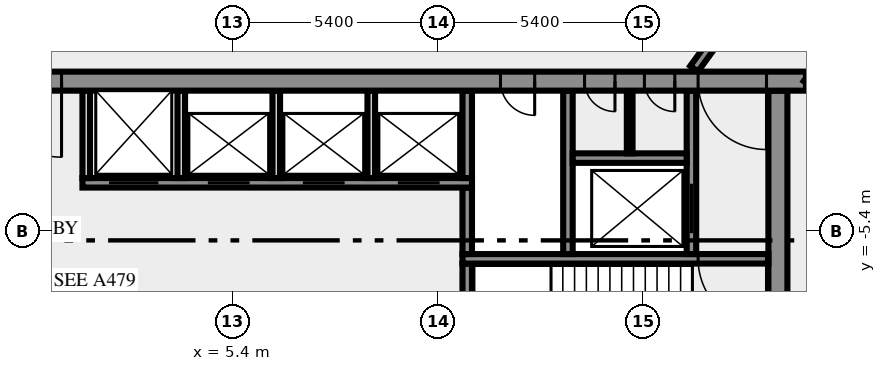
"""IFC4 building model, lengths in metres.
Left out: names, types, materials, properties, quantities, classifications, styles, units other than length and angle.
Written with IfcOpenShell. Run it as: python <this file> out.ifc"""

import sys

from ifc_helpers import new_model, si_unit, direction, frame, frame_2d, origin, place, context, subcontext, project, spatial, rectangle, extrude, element, fill, save


model = new_model("IFC4")
c1 = context("Model", 3, precision=1e-05, world=origin(), true_north=direction((0.0, 1.0)))
c2 = subcontext(c1, "Body", "Model", "MODEL_VIEW")
j1 = project(units=[si_unit("LENGTHUNIT", "METRE"), si_unit("PLANEANGLEUNIT", "RADIAN")], contexts=[c1])
p1 = place(None, origin())
s1 = spatial("IfcSite", under=j1, at=p1, CompositionType="ELEMENT")
p2 = place(p1, origin())
s2 = spatial("IfcBuilding", under=s1, at=p2, CompositionType="ELEMENT")
p3 = place(p2, frame((0.0, 0.0, 148.0)))
s3 = spatial("IfcBuildingStorey", under=s2, at=p3, CompositionType="ELEMENT", Elevation=148.0)
p4 = place(p3, frame((19.75, -10.5, 0.0), z_axis=(0.0, 0.0, 1.0), x_axis=(0.0, 1.0, 0.0)))
e1 = element("IfcWall", 1, at=p4, inside=s3, PredefinedType="SHEAR", context=c2, shape_type="SweptSolid", body=[
    extrude(rectangle(XDim=8.8, YDim=0.5, at=frame_2d((4.4, 0.0))), origin(), (0.0, 0.0, 1.0), 3.65),
])
p5 = place(p3, frame((11.575, -7.25, 0.0), z_axis=(0.0, 0.0, 1.0), x_axis=(0.0, 1.0, 0.0)))
e2 = element("IfcWall", 2, at=p5, inside=s3, PredefinedType="SHEAR", context=c2, shape_type="SweptSolid", body=[
    extrude(rectangle(XDim=1.0, YDim=0.25, at=frame_2d((0.5, 0.0))), origin(), (0.0, 0.0, 1.0), 3.65),
])
p6 = place(p3, frame((19.5, -6.125, 0.0), z_axis=(0.0, 0.0, 1.0), x_axis=(-1.0, 0.0, 0.0)))
e3 = element("IfcWall", 3, at=p6, inside=s3, PredefinedType="SHEAR", context=c2, shape_type="SweptSolid", body=[
    extrude(rectangle(XDim=8.05, YDim=0.25, at=frame_2d((4.025, 0.0))), origin(), (0.0, 0.0, 1.0), 3.65),
])
p7 = place(p6, frame((0.05, 0.0, 0.0)))
e4 = element("IfcOpeningElement", 4, at=p7, cuts=e3, PredefinedType="OPENING", context=c2, shape_type="SweptSolid", body=[
    extrude(rectangle(XDim=1.8, YDim=2.1, at=frame_2d((0.9, 1.05))), frame((0.0, 0.135, 0.0), z_axis=(0.0, -1.0, 0.0), x_axis=(1.0, 0.0, 0.0)), (0.0, 0.0, 1.0), 0.27),
])
p8 = place(p3, frame((11.575, -6.0, 0.0), z_axis=(0.0, 0.0, 1.0), x_axis=(0.0, 1.0, 0.0)))
e5 = element("IfcWall", 5, at=p8, inside=s3, PredefinedType="SHEAR", context=c2, shape_type="SweptSolid", body=[
    extrude(rectangle(XDim=1.75, YDim=0.25, at=frame_2d((0.875, 0.0))), origin(), (0.0, 0.0, 1.0), 3.65),
])
p9 = place(p3, frame((14.225, -6.0, 0.0), z_axis=(0.0, 0.0, 1.0), x_axis=(0.0, 1.0, 0.0)))
e6 = element("IfcWall", 6, at=p9, inside=s3, PredefinedType="SHEAR", context=c2, shape_type="SweptSolid", body=[
    extrude(rectangle(XDim=4.3, YDim=0.25, at=frame_2d((2.15, 0.0))), origin(), (0.0, 0.0, 1.0), 3.65),
])
p10 = place(p3, frame((17.475, -6.0, 0.0), z_axis=(0.0, 0.0, 1.0), x_axis=(0.0, 1.0, 0.0)))
e7 = element("IfcWall", 7, at=p10, inside=s3, PredefinedType="SHEAR", context=c2, shape_type="SweptSolid", body=[
    extrude(rectangle(XDim=4.3, YDim=0.25, at=frame_2d((2.15, 0.0))), origin(), (0.0, 0.0, 1.0), 3.65),
])
p11 = place(p10, frame((0.55, 0.0, 0.0)))
e8 = element("IfcOpeningElement", 8, at=p11, cuts=e7, PredefinedType="OPENING", context=c2, shape_type="SweptSolid", body=[
    extrude(rectangle(XDim=1.3, YDim=2.1, at=frame_2d((0.65, 1.05))), frame((0.0, 0.135, 0.0), z_axis=(0.0, -1.0, 0.0), x_axis=(1.0, 0.0, 0.0)), (0.0, 0.0, 1.0), 0.27),
])
p12 = place(p3, frame((1.45, -4.125, 0.0), z_axis=(0.0, 0.0, 1.0), x_axis=(1.0, 0.0, 0.0)))
e9 = element("IfcWall", 9, at=p12, inside=s3, PredefinedType="SHEAR", context=c2, shape_type="SweptSolid", body=[
    extrude(rectangle(XDim=10.25, YDim=0.25, at=frame_2d((5.125, 0.0))), origin(), (0.0, 0.0, 1.0), 3.65),
])
p13 = place(p12, frame((0.7, 0.0, 0.0)))
e10 = element("IfcOpeningElement", 10, at=p13, cuts=e9, PredefinedType="OPENING", context=c2, shape_type="SweptSolid", body=[
    extrude(rectangle(XDim=1.3, YDim=2.1, at=frame_2d((0.65, 1.05))), frame((0.0, 0.135, 0.0), z_axis=(0.0, -1.0, 0.0), x_axis=(1.0, 0.0, 0.0)), (0.0, 0.0, 1.0), 0.27),
])
p14 = place(p12, frame((3.3, 0.0, 0.0)))
e11 = element("IfcOpeningElement", 11, at=p14, cuts=e9, PredefinedType="OPENING", context=c2, shape_type="SweptSolid", body=[
    extrude(rectangle(XDim=1.1, YDim=2.1, at=frame_2d((0.55, 1.05))), frame((0.0, 0.135, 0.0), z_axis=(0.0, -1.0, 0.0), x_axis=(1.0, 0.0, 0.0)), (0.0, 0.0, 1.0), 0.27),
])
p15 = place(p12, frame((5.8, 0.0, 0.0)))
e12 = element("IfcOpeningElement", 12, at=p15, cuts=e9, PredefinedType="OPENING", context=c2, shape_type="SweptSolid", body=[
    extrude(rectangle(XDim=1.1, YDim=2.1, at=frame_2d((0.55, 1.05))), frame((0.0, 0.135, 0.0), z_axis=(0.0, -1.0, 0.0), x_axis=(1.0, 0.0, 0.0)), (0.0, 0.0, 1.0), 0.27),
])
p16 = place(p12, frame((8.3, 0.0, 0.0)))
e13 = element("IfcOpeningElement", 13, at=p16, cuts=e9, PredefinedType="OPENING", context=c2, shape_type="SweptSolid", body=[
    extrude(rectangle(XDim=1.1, YDim=2.1, at=frame_2d((0.55, 1.05))), frame((0.0, 0.135, 0.0), z_axis=(0.0, -1.0, 0.0), x_axis=(1.0, 0.0, 0.0)), (0.0, 0.0, 1.0), 0.27),
])
for number, where, z_axis, x_axis in (
    (14, (1.55, -4.0, 0.0), (0.0, 0.0, 1.0), (0.0, 1.0, 0.0)),
    (15, (4.05, -4.0, 0.0), (0.0, 0.0, 1.0), (0.0, 1.0, 0.0)),
    (16, (6.55, -4.0, 0.0), (0.0, 0.0, 1.0), (0.0, 1.0, 0.0)),
    (17, (9.05, -4.0, 0.0), (0.0, 0.0, 1.0), (0.0, 1.0, 0.0)),
):
    element("IfcWall", number, at=place(p3, frame(where, z_axis=z_axis, x_axis=x_axis)), inside=s3, PredefinedType="SOLIDWALL", context=c2, shape_type="SweptSolid", body=[
        extrude(rectangle(XDim=2.3, YDim=0.2, at=frame_2d((1.15, 0.0))), origin(), (0.0, 0.0, 1.0), 3.65),
    ])
p17 = place(p3, frame((11.575, -4.0, 0.0), z_axis=(0.0, 0.0, 1.0), x_axis=(0.0, 1.0, 0.0)))
e18 = element("IfcWall", 18, at=p17, inside=s3, PredefinedType="SHEAR", context=c2, shape_type="SweptSolid", body=[
    extrude(rectangle(XDim=2.3, YDim=0.25, at=frame_2d((1.15, 0.0))), origin(), (0.0, 0.0, 1.0), 3.65),
])
p18 = place(p3, frame((14.35, -3.475, 0.0), z_axis=(0.0, 0.0, 1.0), x_axis=(1.0, 0.0, 0.0)))
e19 = element("IfcWall", 19, at=p18, inside=s3, PredefinedType="SHEAR", context=c2, shape_type="SweptSolid", body=[
    extrude(rectangle(XDim=3.0, YDim=0.25, at=frame_2d((1.5, 0.0))), origin(), (0.0, 0.0, 1.0), 3.65),
])
p19 = place(p3, frame((15.85, -3.35, 0.0), z_axis=(0.0, 0.0, 1.0), x_axis=(0.0, 1.0, 0.0)))
e20 = element("IfcWall", 20, at=p19, inside=s3, PredefinedType="PARTITIONING", context=c2, shape_type="SweptSolid", body=[
    extrude(rectangle(XDim=1.65, YDim=0.15, at=frame_2d((0.825, 0.0))), origin(), (0.0, 0.0, 1.0), 3.65),
])
p20 = place(p3, frame((20.49, -1.45, 0.0), z_axis=(0.0, 0.0, 1.0), x_axis=(-1.0, 0.0, 0.0)))
e21 = element("IfcWall", 21, at=p20, inside=s3, PredefinedType="SHEAR", context=c2, shape_type="SweptSolid", body=[
    extrude(rectangle(XDim=40.98, YDim=0.5, at=frame_2d((20.49, 0.0))), origin(), (0.0, 0.0, 1.0), 3.65),
])
p21 = place(p20, frame((38.14, 0.0, 0.0)))
e22 = element("IfcOpeningElement", 22, at=p21, cuts=e21, PredefinedType="OPENING", context=c2, shape_type="SweptSolid", body=[
    extrude(rectangle(XDim=1.8, YDim=2.1, at=frame_2d((0.9, 1.05))), frame((0.0, 0.26, 0.0), z_axis=(0.0, -1.0, 0.0), x_axis=(1.0, 0.0, 0.0)), (0.0, 0.0, 1.0), 0.52),
])
p22 = place(p20, frame((35.89, 0.0, 0.0)))
e23 = element("IfcOpeningElement", 23, at=p22, cuts=e21, PredefinedType="OPENING", context=c2, shape_type="SweptSolid", body=[
    extrude(rectangle(XDim=0.9, YDim=2.1, at=frame_2d((0.45, 1.05))), frame((0.0, 0.26, 0.0), z_axis=(0.0, -1.0, 0.0), x_axis=(1.0, 0.0, 0.0)), (0.0, 0.0, 1.0), 0.52),
])
p23 = place(p20, frame((32.94, 0.0, 0.0)))
e24 = element("IfcOpeningElement", 24, at=p23, cuts=e21, PredefinedType="OPENING", context=c2, shape_type="SweptSolid", body=[
    extrude(rectangle(XDim=0.9, YDim=2.1, at=frame_2d((0.45, 1.05))), frame((0.0, 0.26, 0.0), z_axis=(0.0, -1.0, 0.0), x_axis=(1.0, 0.0, 0.0)), (0.0, 0.0, 1.0), 0.52),
])
p24 = place(p20, frame((29.802, 0.0, 0.0)))
e25 = element("IfcOpeningElement", 25, at=p24, cuts=e21, PredefinedType="OPENING", context=c2, shape_type="SweptSolid", body=[
    extrude(rectangle(XDim=0.9, YDim=2.1, at=frame_2d((0.45, 1.05))), frame((0.0, 0.26, 0.0), z_axis=(0.0, -1.0, 0.0), x_axis=(1.0, 0.0, 0.0)), (0.0, 0.0, 1.0), 0.52),
])
p25 = place(p20, frame((26.077, 0.0, 0.0)))
e26 = element("IfcOpeningElement", 26, at=p25, cuts=e21, PredefinedType="OPENING", context=c2, shape_type="SweptSolid", body=[
    extrude(rectangle(XDim=0.9, YDim=2.1, at=frame_2d((0.45, 1.05))), frame((0.0, 0.26, 0.0), z_axis=(0.0, -1.0, 0.0), x_axis=(1.0, 0.0, 0.0)), (0.0, 0.0, 1.0), 0.52),
])
p26 = place(p20, frame((19.59, 0.0, 0.0)))
e27 = element("IfcOpeningElement", 27, at=p26, cuts=e21, PredefinedType="OPENING", context=c2, shape_type="SweptSolid", body=[
    extrude(rectangle(XDim=2.0, YDim=2.1, at=frame_2d((1.0, 1.05))), frame((0.0, 0.26, 0.0), z_axis=(0.0, -1.0, 0.0), x_axis=(1.0, 0.0, 0.0)), (0.0, 0.0, 1.0), 0.52),
])
p27 = place(p20, frame((7.14, 0.0, 0.0)))
e28 = element("IfcOpeningElement", 28, at=p27, cuts=e21, PredefinedType="OPENING", context=c2, shape_type="SweptSolid", body=[
    extrude(rectangle(XDim=0.9, YDim=2.1, at=frame_2d((0.45, 1.05))), frame((0.0, 0.26, 0.0), z_axis=(0.0, -1.0, 0.0), x_axis=(1.0, 0.0, 0.0)), (0.0, 0.0, 1.0), 0.52),
])
p28 = place(p20, frame((5.028, 0.0, 0.0)))
e29 = element("IfcOpeningElement", 29, at=p28, cuts=e21, PredefinedType="OPENING", context=c2, shape_type="SweptSolid", body=[
    extrude(rectangle(XDim=0.8, YDim=2.1, at=frame_2d((0.4, 1.05))), frame((0.0, 0.26, 0.0), z_axis=(0.0, -1.0, 0.0), x_axis=(1.0, 0.0, 0.0)), (0.0, 0.0, 1.0), 0.52),
])
p29 = place(p20, frame((3.452, 0.0, 0.0)))
e30 = element("IfcOpeningElement", 30, at=p29, cuts=e21, PredefinedType="OPENING", context=c2, shape_type="SweptSolid", body=[
    extrude(rectangle(XDim=0.8, YDim=2.1, at=frame_2d((0.4, 1.05))), frame((0.0, 0.26, 0.0), z_axis=(0.0, -1.0, 0.0), x_axis=(1.0, 0.0, 0.0)), (0.0, 0.0, 1.0), 0.52),
])
p30 = place(p20, frame((1.04, 0.0, 0.0)))
e31 = element("IfcOpeningElement", 31, at=p30, cuts=e21, PredefinedType="OPENING", context=c2, shape_type="SweptSolid", body=[
    extrude(rectangle(XDim=1.8, YDim=2.1, at=frame_2d((0.9, 1.05))), frame((0.0, 0.26, 0.0), z_axis=(0.0, -1.0, 0.0), x_axis=(1.0, 0.0, 0.0)), (0.0, 0.0, 1.0), 0.52),
])
p31 = place(p3, frame((17.545, -1.125, 0.0), z_axis=(0.0, 0.0, 1.0), x_axis=(0.587786330937, 0.809016210693, 0.0)))
e32 = element("IfcWall", 32, at=p31, inside=s3, PredefinedType="SOLIDWALL", context=c2, shape_type="SweptSolid", body=[
    extrude(rectangle(XDim=30.103, YDim=0.25, at=frame_2d((15.052, 0.0))), origin(), (0.0, 0.0, 1.0), 3.65),
])
p32 = place(p31, frame((3.441, 0.0, 0.0)))
e33 = element("IfcOpeningElement", 33, at=p32, cuts=e32, PredefinedType="OPENING", context=c2, shape_type="SweptSolid", body=[
    extrude(rectangle(XDim=0.9, YDim=2.1, at=frame_2d((0.45, 1.05))), frame((0.0, 0.135, 0.0), z_axis=(0.0, -1.0, 0.0), x_axis=(1.0, 0.0, 0.0)), (0.0, 0.0, 1.0), 0.27),
])
p33 = place(p31, frame((20.457, 0.0, 0.0)))
e34 = element("IfcOpeningElement", 34, at=p33, cuts=e32, PredefinedType="OPENING", context=c2, shape_type="SweptSolid", body=[
    extrude(rectangle(XDim=0.9, YDim=2.1, at=frame_2d((0.45, 1.05))), frame((0.0, 0.135, 0.0), z_axis=(0.0, -1.0, 0.0), x_axis=(1.0, 0.0, 0.0)), (0.0, 0.0, 1.0), 0.27),
])
p34 = place(p31, frame((18.858, 0.0, 0.0)))
e35 = element("IfcOpeningElement", 35, at=p34, cuts=e32, PredefinedType="OPENING", context=c2, shape_type="SweptSolid", body=[
    extrude(rectangle(XDim=0.9, YDim=2.1, at=frame_2d((0.45, 1.05))), frame((0.0, 0.135, 0.0), z_axis=(0.0, -1.0, 0.0), x_axis=(1.0, 0.0, 0.0)), (0.0, 0.0, 1.0), 0.27),
])
p35 = place(p3, frame((37.236, 21.469, 0.0), z_axis=(0.0, 0.0, 1.0), x_axis=(-0.58778344073, -0.809018310549, 0.0)))
e36 = element("IfcWall", 36, at=p35, inside=s3, PredefinedType="SOLIDWALL", context=c2, shape_type="SweptSolid", body=[
    extrude(rectangle(XDim=28.42, YDim=0.25, at=frame_2d((14.21, 0.0))), origin(), (0.0, 0.0, 1.0), 3.65),
])
p36 = place(p35, frame((26.988, 0.0, 0.0)))
e37 = element("IfcOpeningElement", 37, at=p36, cuts=e36, PredefinedType="OPENING", context=c2, shape_type="SweptSolid", body=[
    extrude(rectangle(XDim=0.9, YDim=2.1, at=frame_2d((0.45, 1.05))), frame((0.0, 0.135, 0.0), z_axis=(0.0, -1.0, 0.0), x_axis=(1.0, 0.0, 0.0)), (0.0, 0.0, 1.0), 0.27),
])
p37 = place(p35, frame((0.224, 0.0, 0.0)))
e38 = element("IfcOpeningElement", 38, at=p37, cuts=e36, PredefinedType="OPENING", context=c2, shape_type="SweptSolid", body=[
    extrude(rectangle(XDim=0.9, YDim=2.1, at=frame_2d((0.45, 1.05))), frame((0.0, 0.135, 0.0), z_axis=(0.0, -1.0, 0.0), x_axis=(1.0, 0.0, 0.0)), (0.0, 0.0, 1.0), 0.27),
])
p38 = place(p35, frame((9.155, 0.0, 0.0)))
e39 = element("IfcOpeningElement", 39, at=p38, cuts=e36, PredefinedType="OPENING", context=c2, shape_type="SweptSolid", body=[
    extrude(rectangle(XDim=0.9, YDim=2.1, at=frame_2d((0.45, 1.05))), frame((0.0, 0.135, 0.0), z_axis=(0.0, -1.0, 0.0), x_axis=(1.0, 0.0, 0.0)), (0.0, 0.0, 1.0), 0.27),
])
p39 = place(p7, origin())
e40 = element("IfcDoor", 40, at=p39, inside=s3, OperationType="DOUBLE_DOOR_SINGLE_SWING", PredefinedType="DOOR", context=c2, shape_type="SweptSolid", body=[
    extrude(rectangle(XDim=1.8, YDim=2.1, at=frame_2d((0.9, 1.05))), frame((0.0, 0.025, 0.0), z_axis=(0.0, -1.0, 0.0), x_axis=(1.0, 0.0, 0.0)), (0.0, 0.0, 1.0), 0.05),
])
fill(e4, e40)
p40 = place(p11, origin())
e41 = element("IfcDoor", 41, at=p40, inside=s3, OperationType="DOUBLE_DOOR_SLIDING", PredefinedType="DOOR", context=c2, shape_type="SweptSolid", body=[
    extrude(rectangle(XDim=1.3, YDim=2.1, at=frame_2d((0.65, 1.05))), frame((0.0, 0.025, 0.0), z_axis=(0.0, -1.0, 0.0), x_axis=(1.0, 0.0, 0.0)), (0.0, 0.0, 1.0), 0.05),
])
fill(e8, e41)
p41 = place(p13, origin())
e42 = element("IfcDoor", 42, at=p41, inside=s3, OperationType="DOUBLE_DOOR_SLIDING", PredefinedType="DOOR", context=c2, shape_type="SweptSolid", body=[
    extrude(rectangle(XDim=1.3, YDim=2.1, at=frame_2d((0.65, 1.05))), frame((0.0, 0.025, 0.0), z_axis=(0.0, -1.0, 0.0), x_axis=(1.0, 0.0, 0.0)), (0.0, 0.0, 1.0), 0.05),
])
fill(e10, e42)
p42 = place(p14, origin())
e43 = element("IfcDoor", 43, at=p42, inside=s3, OperationType="DOUBLE_DOOR_SLIDING", PredefinedType="DOOR", context=c2, shape_type="SweptSolid", body=[
    extrude(rectangle(XDim=1.1, YDim=2.1, at=frame_2d((0.55, 1.05))), frame((0.0, 0.025, 0.0), z_axis=(0.0, -1.0, 0.0), x_axis=(1.0, 0.0, 0.0)), (0.0, 0.0, 1.0), 0.05),
])
fill(e11, e43)
p43 = place(p15, origin())
e44 = element("IfcDoor", 44, at=p43, inside=s3, OperationType="DOUBLE_DOOR_SLIDING", PredefinedType="DOOR", context=c2, shape_type="SweptSolid", body=[
    extrude(rectangle(XDim=1.1, YDim=2.1, at=frame_2d((0.55, 1.05))), frame((0.0, 0.025, 0.0), z_axis=(0.0, -1.0, 0.0), x_axis=(1.0, 0.0, 0.0)), (0.0, 0.0, 1.0), 0.05),
])
fill(e12, e44)
p44 = place(p16, origin())
e45 = element("IfcDoor", 45, at=p44, inside=s3, OperationType="DOUBLE_DOOR_SLIDING", PredefinedType="DOOR", context=c2, shape_type="SweptSolid", body=[
    extrude(rectangle(XDim=1.1, YDim=2.1, at=frame_2d((0.55, 1.05))), frame((0.0, 0.025, 0.0), z_axis=(0.0, -1.0, 0.0), x_axis=(1.0, 0.0, 0.0)), (0.0, 0.0, 1.0), 0.05),
])
fill(e13, e45)
p45 = place(p26, origin())
e46 = element("IfcDoor", 46, at=p45, inside=s3, OperationType="DOUBLE_DOOR_SINGLE_SWING", PredefinedType="DOOR", context=c2, shape_type="SweptSolid", body=[
    extrude(rectangle(XDim=2.0, YDim=2.1, at=frame_2d((1.0, 1.05))), frame((0.0, 0.025, 0.0), z_axis=(0.0, -1.0, 0.0), x_axis=(1.0, 0.0, 0.0)), (0.0, 0.0, 1.0), 0.05),
])
fill(e27, e46)
p46 = place(p27, origin())
e47 = element("IfcDoor", 47, at=p46, inside=s3, OperationType="SINGLE_SWING_LEFT", PredefinedType="DOOR", context=c2, shape_type="SweptSolid", body=[
    extrude(rectangle(XDim=0.9, YDim=2.1, at=frame_2d((0.45, 1.05))), frame((0.0, 0.025, 0.0), z_axis=(0.0, -1.0, 0.0), x_axis=(1.0, 0.0, 0.0)), (0.0, 0.0, 1.0), 0.05),
])
fill(e28, e47)
p47 = place(p28, origin())
e48 = element("IfcDoor", 48, at=p47, inside=s3, OperationType="SINGLE_SWING_LEFT", PredefinedType="DOOR", context=c2, shape_type="SweptSolid", body=[
    extrude(rectangle(XDim=0.8, YDim=2.1, at=frame_2d((0.4, 1.05))), frame((0.0, 0.025, 0.0), z_axis=(0.0, -1.0, 0.0), x_axis=(1.0, 0.0, 0.0)), (0.0, 0.0, 1.0), 0.05),
])
fill(e29, e48)
p48 = place(p29, origin())
e49 = element("IfcDoor", 49, at=p48, inside=s3, OperationType="SINGLE_SWING_LEFT", PredefinedType="DOOR", context=c2, shape_type="SweptSolid", body=[
    extrude(rectangle(XDim=0.8, YDim=2.1, at=frame_2d((0.4, 1.05))), frame((0.0, 0.025, 0.0), z_axis=(0.0, -1.0, 0.0), x_axis=(1.0, 0.0, 0.0)), (0.0, 0.0, 1.0), 0.05),
])
fill(e30, e49)
p49 = place(p30, origin())
e50 = element("IfcDoor", 50, at=p49, inside=s3, OperationType="DOUBLE_DOOR_SINGLE_SWING", PredefinedType="DOOR", context=c2, shape_type="SweptSolid", body=[
    extrude(rectangle(XDim=1.8, YDim=2.1, at=frame_2d((0.9, 1.05))), frame((0.0, 0.025, 0.0), z_axis=(0.0, -1.0, 0.0), x_axis=(1.0, 0.0, 0.0)), (0.0, 0.0, 1.0), 0.05),
])
fill(e31, e50)
save(model, sys.argv[1])
